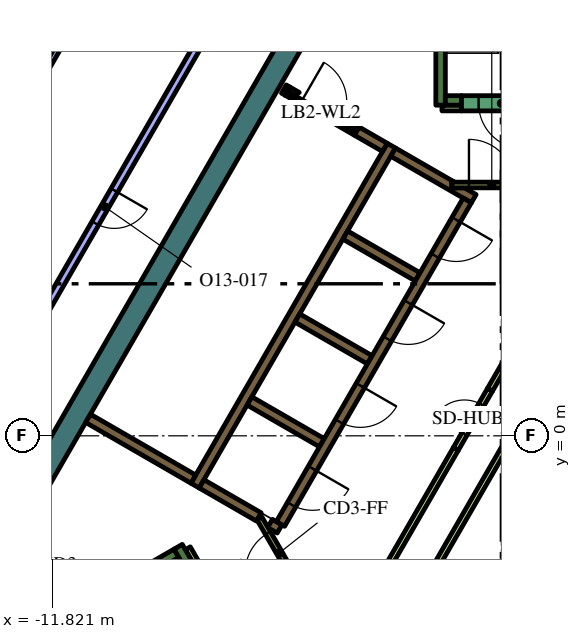
"""IFC4 building model, lengths in metres.
Left out: names, types, materials, properties, quantities, classifications, styles, units other than length and angle.
Written with IfcOpenShell. Run it as: python <this file> out.ifc"""

import sys

from ifc_helpers import new_model, si_unit, direction, frame, frame_2d, origin, place, context, subcontext, project, spatial, polyline, rectangle, outline, extrude, element, fill, save


model = new_model("IFC4")
c1 = context("Model", 3, precision=1e-05, world=origin(), true_north=direction((0.0, 1.0)))
c2 = subcontext(c1, "Body", "Model", "MODEL_VIEW")
j1 = project(units=[si_unit("LENGTHUNIT", "METRE"), si_unit("PLANEANGLEUNIT", "RADIAN")], contexts=[c1])
p1 = place(None, origin())
s1 = spatial("IfcSite", under=j1, at=p1, CompositionType="ELEMENT")
p2 = place(p1, origin())
s2 = spatial("IfcBuilding", under=s1, at=p2, CompositionType="ELEMENT")
p3 = place(p2, frame((0.0, 0.0, 296.4)))
s3 = spatial("IfcBuildingStorey", under=s2, at=p3, CompositionType="ELEMENT", Elevation=296.4)
p4 = place(p3, frame((-12.582, -1.892, 0.0), z_axis=(0.0, 0.0, 1.0), x_axis=(0.500003640647, 0.866023301845, 0.0)))
e1 = element("IfcWall", 1, at=p4, inside=s3, PredefinedType="SOLIDWALL", context=c2, shape_type="SweptSolid", body=[
    extrude(rectangle(XDim=15.858, YDim=0.6, at=frame_2d((7.929, 0.0))), origin(), (0.0, 0.0, 1.0), 4.2),
])
p5 = place(p3, frame((-1.6, 8.7, 0.0), z_axis=(0.0, 0.0, 1.0), x_axis=(0.0, 1.0, 0.0)))
e2 = element("IfcWall", 2, at=p5, inside=s3, PredefinedType="SOLIDWALL", context=c2, shape_type="SweptSolid", body=[
    extrude(rectangle(XDim=7.05, YDim=0.25, at=frame_2d((3.525, 0.0))), origin(), (0.0, 0.0, 1.0), 4.2),
])
p6 = place(p3, frame((-1.475, 8.825, 0.0), z_axis=(0.0, 0.0, 1.0), x_axis=(1.0, 0.0, 0.0)))
e3 = element("IfcWall", 3, at=p6, inside=s3, PredefinedType="SOLIDWALL", context=c2, shape_type="SweptSolid", body=[
    extrude(rectangle(XDim=0.425, YDim=0.25, at=frame_2d((0.212, 0.0))), origin(), (0.0, 0.0, 1.0), 4.2),
])
p7 = place(p3, frame((-14.44, -6.49, 0.0), z_axis=(0.0, 0.0, 1.0), x_axis=(0.866022966069, 0.500004222222, 0.0)))
e4 = element("IfcWall", 4, at=p7, inside=s3, PredefinedType="SOLIDWALL", context=c2, shape_type="SweptSolid", body=[
    extrude(rectangle(XDim=6.8, YDim=0.25, at=frame_2d((3.4, 0.0))), origin(), (0.0, 0.0, 1.0), 4.2),
])
p8 = place(p3, frame((-8.168, -3.503, 0.0), z_axis=(0.0, 0.0, 1.0), x_axis=(-0.499952099219, 0.866053057547, 0.0)))
e5 = element("IfcWall", 5, at=p8, inside=s3, PredefinedType="SOLIDWALL", context=c2, shape_type="SweptSolid", body=[
    extrude(rectangle(XDim=0.675, YDim=0.25, at=frame_2d((0.337, 0.0))), origin(), (0.0, 0.0, 1.0), 4.2),
])
p9 = place(p3, frame((-8.06, -1.311, 0.0), z_axis=(0.0, 0.0, 1.0), x_axis=(0.50000273126, 0.866023826885, 0.0)))
e6 = element("IfcWall", 6, at=p9, inside=s3, PredefinedType="SOLIDWALL", context=c2, shape_type="SweptSolid", body=[
    extrude(rectangle(XDim=10.33, YDim=0.25, at=frame_2d((5.165, 0.0))), origin(), (0.0, 0.0, 1.0), 4.2),
])
p10 = place(p3, origin())
e7 = element("IfcWall", 7, at=p10, inside=s3, PredefinedType="SOLIDWALL", context=c2, shape_type="SweptSolid", body=[
    extrude(outline(polyline([(-2.912, 7.356), (-2.787, 7.573), (-1.232, 6.675), (-1.303, 6.675), (-1.304, 6.675), (-1.304, 6.675), (-1.304, 6.525), (-1.304, 6.525), (-1.303, 6.525), (-0.971, 6.525), (-0.665, 6.348), (-0.79, 6.132), (-1.007, 6.257), (-1.007, 6.257), (-2.912, 7.356)])), origin(), (0.0, 0.0, 1.0), 4.2),
])
for number, where, z_axis, x_axis in (
    (8, (-2.204, 4.182, 0.0), (0.0, 0.0, 1.0), (-0.866, 0.5, 0.0)),
    (9, (-5.369, 3.1, 0.0), (0.0, 0.0, 1.0), (0.866, -0.5, 0.0)),
    (10, (-4.724, -0.182, 0.0), (0.0, 0.0, 1.0), (-0.866, 0.5, 0.0)),
):
    element("IfcWall", number, at=place(p3, frame(where, z_axis=z_axis, x_axis=x_axis)), inside=s3, PredefinedType="SOLIDWALL", context=c2, shape_type="SweptSolid", body=[
        extrude(rectangle(XDim=2.2, YDim=0.25, at=frame_2d((1.1, 0.0))), origin(), (0.0, 0.0, 1.0), 4.2),
    ])
p11 = place(p3, frame((-6.088, -2.305, 0.0), z_axis=(0.0, 0.0, 1.0), x_axis=(0.866059450854, -0.499941024108, 0.0)))
e11 = element("IfcWall", 11, at=p11, inside=s3, PredefinedType="SOLIDWALL", context=c2, shape_type="SweptSolid", body=[
    extrude(rectangle(XDim=0.29, YDim=0.25, at=frame_2d((0.145, 0.0))), origin(), (0.0, 0.0, 1.0), 4.2),
])
p12 = place(p3, frame((-7.889, -1.265, 0.0), z_axis=(0.0, 0.0, 1.0), x_axis=(0.865986741702, -0.500066958712, 0.0)))
e12 = element("IfcWall", 12, at=p12, inside=s3, PredefinedType="SOLIDWALL", context=c2, shape_type="SweptSolid", body=[
    extrude(rectangle(XDim=1.738, YDim=0.25, at=frame_2d((0.869, 0.0))), origin(), (0.0, 0.0, 1.0), 4.2),
])
p13 = place(p3, frame((-8.106, -1.14, 0.0), z_axis=(0.0, 0.0, 1.0), x_axis=(-0.866008981251, 0.500028443584, 0.0)))
e13 = element("IfcWall", 13, at=p13, inside=s3, PredefinedType="SOLIDWALL", context=c2, shape_type="SweptSolid", body=[
    extrude(rectangle(XDim=3.2, YDim=0.25, at=frame_2d((1.6, 0.0))), origin(), (0.0, 0.0, 1.0), 4.2),
])
p14 = place(p3, frame((-5.725, 9.125, 0.0), z_axis=(0.0, 0.0, 1.0), x_axis=(0.866185586049, -0.49972245349, 0.0)))
e14 = element("IfcWall", 14, at=p14, inside=s3, PredefinedType="SOLIDWALL", context=c2, shape_type="SweptSolid", body=[
    extrude(rectangle(XDim=0.11, YDim=0.25, at=frame_2d((0.055, 0.0))), origin(), (0.0, 0.0, 1.0), 4.2),
])
p15 = place(p3, frame((-3.066, 7.59, 0.0), z_axis=(0.0, 0.0, 1.0), x_axis=(-0.866081358704, 0.49990307071, 0.0)))
e15 = element("IfcWall", 15, at=p15, inside=s3, PredefinedType="SOLIDWALL", context=c2, shape_type="SweptSolid", body=[
    extrude(rectangle(XDim=0.858, YDim=0.25, at=frame_2d((0.429, 0.0))), origin(), (0.0, 0.0, 1.0), 4.2),
])
e16 = element("IfcWall", 16, at=p10, inside=s3, PredefinedType="SOLIDWALL", context=c2, shape_type="SweptSolid", body=[
    extrude(outline(polyline([(-3.748, 8.128), (-3.813, 8.015), (-4.027, 8.139), (-4.017, 8.156), (-4.008, 8.173), (-4.0, 8.192), (-3.995, 8.21), (-3.991, 8.23), (-3.99, 8.25), (-3.99, 8.268), (-3.748, 8.128)])), origin(), (0.0, 0.0, 1.0), 4.2),
])
e17 = element("IfcWall", 17, at=p10, inside=s3, PredefinedType="SOLIDWALL", context=c2, shape_type="SweptSolid", body=[
    extrude(outline(polyline([(-5.689, 8.96), (-5.69, 8.961), (-5.565, 9.177), (-5.319, 9.035), (-5.335, 9.026), (-5.351, 9.015), (-5.366, 9.002), (-5.379, 8.988), (-5.392, 8.972), (-5.402, 8.956), (-5.412, 8.939), (-5.629, 9.064), (-5.629, 9.064), (-5.689, 8.96)])), origin(), (0.0, 0.0, 1.0), 4.2),
])
for number, where, z_axis, x_axis in (
    (18, (-8.252, -2.958, 0.0), (0.0, 0.0, 1.0), (0.5, -0.866, 0.0)),
    (19, (-1.564, 8.625, 0.0), (0.0, 0.0, 1.0), (1.0, 0.0, 0.0)),
):
    element("IfcWall", number, at=place(p3, frame(where, z_axis=z_axis, x_axis=x_axis)), inside=s3, PredefinedType="PARTITIONING", context=c2, shape_type="SweptSolid", body=[
        extrude(rectangle(XDim=0.514, YDim=0.15, at=frame_2d((0.257, 0.0))), origin(), (0.0, 0.0, 1.0), 3.55),
    ])
p16 = place(p3, frame((-1.887, -3.718, 0.0), z_axis=(0.0, 0.0, 1.0), x_axis=(0.500005008002, 0.866022512394, 0.0)))
e20 = element("IfcWall", 20, at=p16, inside=s3, PredefinedType="PARTITIONING", context=c2, shape_type="SweptSolid", body=[
    extrude(rectangle(XDim=8.327, YDim=0.15, at=frame_2d((4.164, 0.0))), origin(), (0.0, 0.0, 1.0), 3.55),
])
p17 = place(p3, frame((-3.147, -3.718, 0.0), z_axis=(0.0, 0.0, 1.0), x_axis=(0.500010131483, 0.866019554291, 0.0)))
e21 = element("IfcWall", 21, at=p17, inside=s3, PredefinedType="PARTITIONING", context=c2, shape_type="SweptSolid", body=[
    extrude(rectangle(XDim=3.894, YDim=0.15, at=frame_2d((1.947, 0.0))), origin(), (0.0, 0.0, 1.0), 3.55),
])
p18 = place(p3, frame((-0.3, 1.212, 0.0), z_axis=(0.0, 0.0, 1.0), x_axis=(0.499963101113, 0.866046706318, 0.0)))
e22 = element("IfcWall", 22, at=p18, inside=s3, PredefinedType="PARTITIONING", context=c2, shape_type="SweptSolid", body=[
    extrude(rectangle(XDim=3.893, YDim=0.15, at=frame_2d((1.947, 0.0))), origin(), (0.0, 0.0, 1.0), 3.55),
])
p19 = place(p3, frame((-0.898, 6.194, 0.0), z_axis=(0.0, 0.0, 1.0), x_axis=(-0.499996202215, -0.866027596426, 0.0)))
e23 = element("IfcWall", 23, at=p19, inside=s3, PredefinedType="SOLIDWALL", context=c2, shape_type="SweptSolid", body=[
    extrude(rectangle(XDim=9.83, YDim=0.25, at=frame_2d((4.915, 0.0))), origin(), (0.0, 0.0, 1.0), 4.2),
])
p20 = place(p19, frame((0.585, 0.0, 0.0)))
e24 = element("IfcOpeningElement", 24, at=p20, cuts=e23, PredefinedType="OPENING", context=c2, shape_type="SweptSolid", body=[
    extrude(rectangle(XDim=1.1, YDim=2.1, at=frame_2d((0.55, 1.05))), frame((0.0, 0.135, 0.0), z_axis=(0.0, -1.0, 0.0), x_axis=(1.0, 0.0, 0.0)), (0.0, 0.0, 1.0), 0.27),
])
p21 = place(p19, frame((3.105, 0.0, 0.0)))
e25 = element("IfcOpeningElement", 25, at=p21, cuts=e23, PredefinedType="OPENING", context=c2, shape_type="SweptSolid", body=[
    extrude(rectangle(XDim=1.1, YDim=2.1, at=frame_2d((0.55, 1.05))), frame((0.0, 0.135, 0.0), z_axis=(0.0, -1.0, 0.0), x_axis=(1.0, 0.0, 0.0)), (0.0, 0.0, 1.0), 0.27),
])
p22 = place(p19, frame((5.625, 0.0, 0.0)))
e26 = element("IfcOpeningElement", 26, at=p22, cuts=e23, PredefinedType="OPENING", context=c2, shape_type="SweptSolid", body=[
    extrude(rectangle(XDim=1.1, YDim=2.1, at=frame_2d((0.55, 1.05))), frame((0.0, 0.135, 0.0), z_axis=(0.0, -1.0, 0.0), x_axis=(1.0, 0.0, 0.0)), (0.0, 0.0, 1.0), 0.27),
])
p23 = place(p19, frame((8.145, 0.0, 0.0)))
e27 = element("IfcOpeningElement", 27, at=p23, cuts=e23, PredefinedType="OPENING", context=c2, shape_type="SweptSolid", body=[
    extrude(rectangle(XDim=1.1, YDim=2.1, at=frame_2d((0.55, 1.05))), frame((0.0, 0.135, 0.0), z_axis=(0.0, -1.0, 0.0), x_axis=(1.0, 0.0, 0.0)), (0.0, 0.0, 1.0), 0.27),
])
p24 = place(p3, frame((1.05, 8.75, 0.0), z_axis=(0.0, 0.0, 1.0), x_axis=(-1.0, 0.0, 0.0)))
e28 = element("IfcWall", 28, at=p24, inside=s3, PredefinedType="SOLIDWALL", context=c2, shape_type="SweptSolid", body=[
    extrude(rectangle(XDim=2.1, YDim=0.4, at=frame_2d((1.05, 0.0))), origin(), (0.0, 0.0, 1.0), 4.2),
])
p25 = place(p24, frame((0.45, 0.0, 0.0)))
e29 = element("IfcOpeningElement", 29, at=p25, cuts=e28, PredefinedType="OPENING", context=c2, shape_type="SweptSolid", body=[
    extrude(rectangle(XDim=1.2, YDim=2.1, at=frame_2d((0.6, 1.05))), frame((0.0, 0.21, 0.0), z_axis=(0.0, -1.0, 0.0), x_axis=(1.0, 0.0, 0.0)), (0.0, 0.0, 1.0), 0.42),
])
p26 = place(p3, frame((-1.303, 6.6, 0.0), z_axis=(0.0, 0.0, 1.0), x_axis=(1.0, 0.0, 0.0)))
e30 = element("IfcWall", 30, at=p26, inside=s3, PredefinedType="PARTITIONING", context=c2, shape_type="SweptSolid", body=[
    extrude(rectangle(XDim=2.1, YDim=0.15, at=frame_2d((1.05, 0.0))), origin(), (0.0, 0.0, 1.0), 4.2),
])
p27 = place(p26, frame((0.45, 0.0, 0.0)))
e31 = element("IfcOpeningElement", 31, at=p27, cuts=e30, PredefinedType="OPENING", context=c2, shape_type="SweptSolid", body=[
    extrude(rectangle(XDim=1.2, YDim=2.1, at=frame_2d((0.6, 1.05))), frame((0.0, 0.085, 0.0), z_axis=(0.0, -1.0, 0.0), x_axis=(1.0, 0.0, 0.0)), (0.0, 0.0, 1.0), 0.17),
])
p28 = place(p3, frame((-5.317, -3.99, 0.0), z_axis=(0.0, 0.0, 1.0), x_axis=(-0.500027713859, 0.866009402589, 0.0)))
e32 = element("IfcWall", 32, at=p28, inside=s3, PredefinedType="PARTITIONING", context=c2, shape_type="SweptSolid", body=[
    extrude(rectangle(XDim=2.1, YDim=0.15, at=frame_2d((1.05, 0.0))), origin(), (0.0, 0.0, 1.0), 4.2),
])
p29 = place(p28, frame((0.45, 0.0, 0.0)))
e33 = element("IfcOpeningElement", 33, at=p29, cuts=e32, PredefinedType="OPENING", context=c2, shape_type="SweptSolid", body=[
    extrude(rectangle(XDim=1.2, YDim=2.1, at=frame_2d((0.6, 1.05))), frame((0.0, 0.085, 0.0), z_axis=(0.0, -1.0, 0.0), x_axis=(1.0, 0.0, 0.0)), (0.0, 0.0, 1.0), 0.17),
])
p30 = place(p3, frame((-5.659, 9.012, 0.0), z_axis=(0.0, 0.0, 1.0), x_axis=(0.866009402589, -0.500027713859, 0.0)))
e34 = element("IfcWall", 34, at=p30, inside=s3, PredefinedType="PARTITIONING", context=c2, shape_type="SweptSolid", body=[
    extrude(rectangle(XDim=2.1, YDim=0.12, at=frame_2d((1.05, 0.0))), origin(), (0.0, 0.0, 1.0), 3.55),
])
p31 = place(p30, frame((0.45, 0.0, 0.0)))
e35 = element("IfcOpeningElement", 35, at=p31, cuts=e34, PredefinedType="OPENING", context=c2, shape_type="SweptSolid", body=[
    extrude(rectangle(XDim=1.2, YDim=2.1, at=frame_2d((0.6, 1.05))), frame((0.0, 0.07, 0.0), z_axis=(0.0, -1.0, 0.0), x_axis=(1.0, 0.0, 0.0)), (0.0, 0.0, 1.0), 0.14),
])
p32 = place(p3, frame((-1.2, -0.346, 0.0), z_axis=(0.0, 0.0, 1.0), x_axis=(0.499961193289, 0.866047807691, 0.0)))
e36 = element("IfcWall", 36, at=p32, inside=s3, PredefinedType="PARTITIONING", context=c2, shape_type="SweptSolid", body=[
    extrude(rectangle(XDim=1.8, YDim=0.15, at=frame_2d((0.9, 0.0))), origin(), (0.0, 0.0, 1.0), 3.55),
])
p33 = place(p32, frame((0.45, 0.0, 0.0)))
e37 = element("IfcOpeningElement", 37, at=p33, cuts=e36, PredefinedType="OPENING", context=c2, shape_type="SweptSolid", body=[
    extrude(rectangle(XDim=0.9, YDim=2.1, at=frame_2d((0.45, 1.05))), frame((0.0, 0.085, 0.0), z_axis=(0.0, -1.0, 0.0), x_axis=(1.0, 0.0, 0.0)), (0.0, 0.0, 1.0), 0.17),
])
p34 = place(p3, frame((-14.74, 4.887, 0.0), z_axis=(0.0, 0.0, 1.0), x_axis=(0.500007141444, 0.86602128063, 0.0)))
e38 = element("IfcWall", 38, at=p34, inside=s3, PredefinedType="PARTITIONING", context=c2, shape_type="SweptSolid", body=[
    extrude(rectangle(XDim=6.137, YDim=0.15, at=frame_2d((3.068, 0.0))), origin(), (0.0, 0.0, 1.0), 3.55),
])
p35 = place(p34, frame((2.637, 0.0, 0.0)))
e39 = element("IfcOpeningElement", 39, at=p35, cuts=e38, PredefinedType="OPENING", context=c2, shape_type="SweptSolid", body=[
    extrude(rectangle(XDim=0.9, YDim=2.1, at=frame_2d((0.45, 1.05))), frame((0.0, 0.085, 0.0), z_axis=(0.0, -1.0, 0.0), x_axis=(1.0, 0.0, 0.0)), (0.0, 0.0, 1.0), 0.17),
])
p36 = place(p3, frame((-7.436, 11.221, 0.0), z_axis=(0.0, 0.0, 1.0), x_axis=(-0.49999894854, -0.866026010844, 0.0)))
e40 = element("IfcWall", 40, at=p36, inside=s3, PredefinedType="PARTITIONING", context=c2, shape_type="SweptSolid", body=[
    extrude(rectangle(XDim=12.0, YDim=0.2, at=frame_2d((6.0, 0.0))), origin(), (0.0, 0.0, 1.0), 3.55),
])
p37 = place(p36, frame((5.5, 0.0, 0.0)))
e41 = element("IfcOpeningElement", 41, at=p37, cuts=e40, PredefinedType="OPENING", context=c2, shape_type="SweptSolid", body=[
    extrude(rectangle(XDim=1.0, YDim=2.1, at=frame_2d((0.5, 1.05))), frame((0.0, 0.11, 0.0), z_axis=(0.0, -1.0, 0.0), x_axis=(1.0, 0.0, 0.0)), (0.0, 0.0, 1.0), 0.22),
])
p38 = place(p20, origin())
e42 = element("IfcDoor", 42, at=p38, inside=s3, OperationType="DOUBLE_DOOR_SLIDING", PredefinedType="DOOR", context=c2, shape_type="SweptSolid", body=[
    extrude(rectangle(XDim=1.1, YDim=2.1, at=frame_2d((0.55, 1.05))), frame((0.0, 0.025, 0.0), z_axis=(0.0, -1.0, 0.0), x_axis=(1.0, 0.0, 0.0)), (0.0, 0.0, 1.0), 0.05),
])
fill(e24, e42)
p39 = place(p21, origin())
e43 = element("IfcDoor", 43, at=p39, inside=s3, OperationType="DOUBLE_DOOR_SLIDING", PredefinedType="DOOR", context=c2, shape_type="SweptSolid", body=[
    extrude(rectangle(XDim=1.1, YDim=2.1, at=frame_2d((0.55, 1.05))), frame((0.0, 0.025, 0.0), z_axis=(0.0, -1.0, 0.0), x_axis=(1.0, 0.0, 0.0)), (0.0, 0.0, 1.0), 0.05),
])
fill(e25, e43)
p40 = place(p22, origin())
e44 = element("IfcDoor", 44, at=p40, inside=s3, OperationType="DOUBLE_DOOR_SLIDING", PredefinedType="DOOR", context=c2, shape_type="SweptSolid", body=[
    extrude(rectangle(XDim=1.1, YDim=2.1, at=frame_2d((0.55, 1.05))), frame((0.0, 0.025, 0.0), z_axis=(0.0, -1.0, 0.0), x_axis=(1.0, 0.0, 0.0)), (0.0, 0.0, 1.0), 0.05),
])
fill(e26, e44)
p41 = place(p23, origin())
e45 = element("IfcDoor", 45, at=p41, inside=s3, OperationType="DOUBLE_DOOR_SLIDING", PredefinedType="DOOR", context=c2, shape_type="SweptSolid", body=[
    extrude(rectangle(XDim=1.1, YDim=2.1, at=frame_2d((0.55, 1.05))), frame((0.0, 0.025, 0.0), z_axis=(0.0, -1.0, 0.0), x_axis=(1.0, 0.0, 0.0)), (0.0, 0.0, 1.0), 0.05),
])
fill(e27, e45)
p42 = place(p25, origin())
e46 = element("IfcDoor", 46, at=p42, inside=s3, OperationType="SINGLE_SWING_LEFT", PredefinedType="DOOR", context=c2, shape_type="SweptSolid", body=[
    extrude(rectangle(XDim=1.2, YDim=2.1, at=frame_2d((0.6, 1.05))), frame((0.0, 0.025, 0.0), z_axis=(0.0, -1.0, 0.0), x_axis=(1.0, 0.0, 0.0)), (0.0, 0.0, 1.0), 0.05),
])
fill(e29, e46)
p43 = place(p27, origin())
e47 = element("IfcDoor", 47, at=p43, inside=s3, OperationType="SINGLE_SWING_LEFT", PredefinedType="DOOR", context=c2, shape_type="SweptSolid", body=[
    extrude(rectangle(XDim=1.2, YDim=2.1, at=frame_2d((0.6, 1.05))), frame((0.0, 0.025, 0.0), z_axis=(0.0, -1.0, 0.0), x_axis=(1.0, 0.0, 0.0)), (0.0, 0.0, 1.0), 0.05),
])
fill(e31, e47)
p44 = place(p29, origin())
e48 = element("IfcDoor", 48, at=p44, inside=s3, OperationType="SINGLE_SWING_LEFT", PredefinedType="DOOR", context=c2, shape_type="SweptSolid", body=[
    extrude(rectangle(XDim=1.2, YDim=2.1, at=frame_2d((0.6, 1.05))), frame((0.0, 0.025, 0.0), z_axis=(0.0, -1.0, 0.0), x_axis=(1.0, 0.0, 0.0)), (0.0, 0.0, 1.0), 0.05),
])
fill(e33, e48)
p45 = place(p31, origin())
e49 = element("IfcDoor", 49, at=p45, inside=s3, OperationType="SINGLE_SWING_LEFT", PredefinedType="DOOR", context=c2, shape_type="SweptSolid", body=[
    extrude(rectangle(XDim=1.2, YDim=2.1, at=frame_2d((0.6, 1.05))), frame((0.0, 0.025, 0.0), z_axis=(0.0, -1.0, 0.0), x_axis=(1.0, 0.0, 0.0)), (0.0, 0.0, 1.0), 0.05),
])
fill(e35, e49)
p46 = place(p33, origin())
e50 = element("IfcDoor", 50, at=p46, inside=s3, OperationType="SINGLE_SWING_LEFT", PredefinedType="DOOR", context=c2, shape_type="SweptSolid", body=[
    extrude(rectangle(XDim=0.9, YDim=2.1, at=frame_2d((0.45, 1.05))), frame((0.0, 0.025, 0.0), z_axis=(0.0, -1.0, 0.0), x_axis=(1.0, 0.0, 0.0)), (0.0, 0.0, 1.0), 0.05),
])
fill(e37, e50)
p47 = place(p37, origin())
e51 = element("IfcDoor", 51, at=p47, inside=s3, OperationType="SINGLE_SWING_RIGHT", PredefinedType="DOOR", context=c2, shape_type="SweptSolid", body=[
    extrude(rectangle(XDim=1.0, YDim=2.1, at=frame_2d((0.5, 1.05))), frame((0.0, 0.025, 0.0), z_axis=(0.0, -1.0, 0.0), x_axis=(1.0, 0.0, 0.0)), (0.0, 0.0, 1.0), 0.05),
])
fill(e41, e51)
save(model, sys.argv[1])
